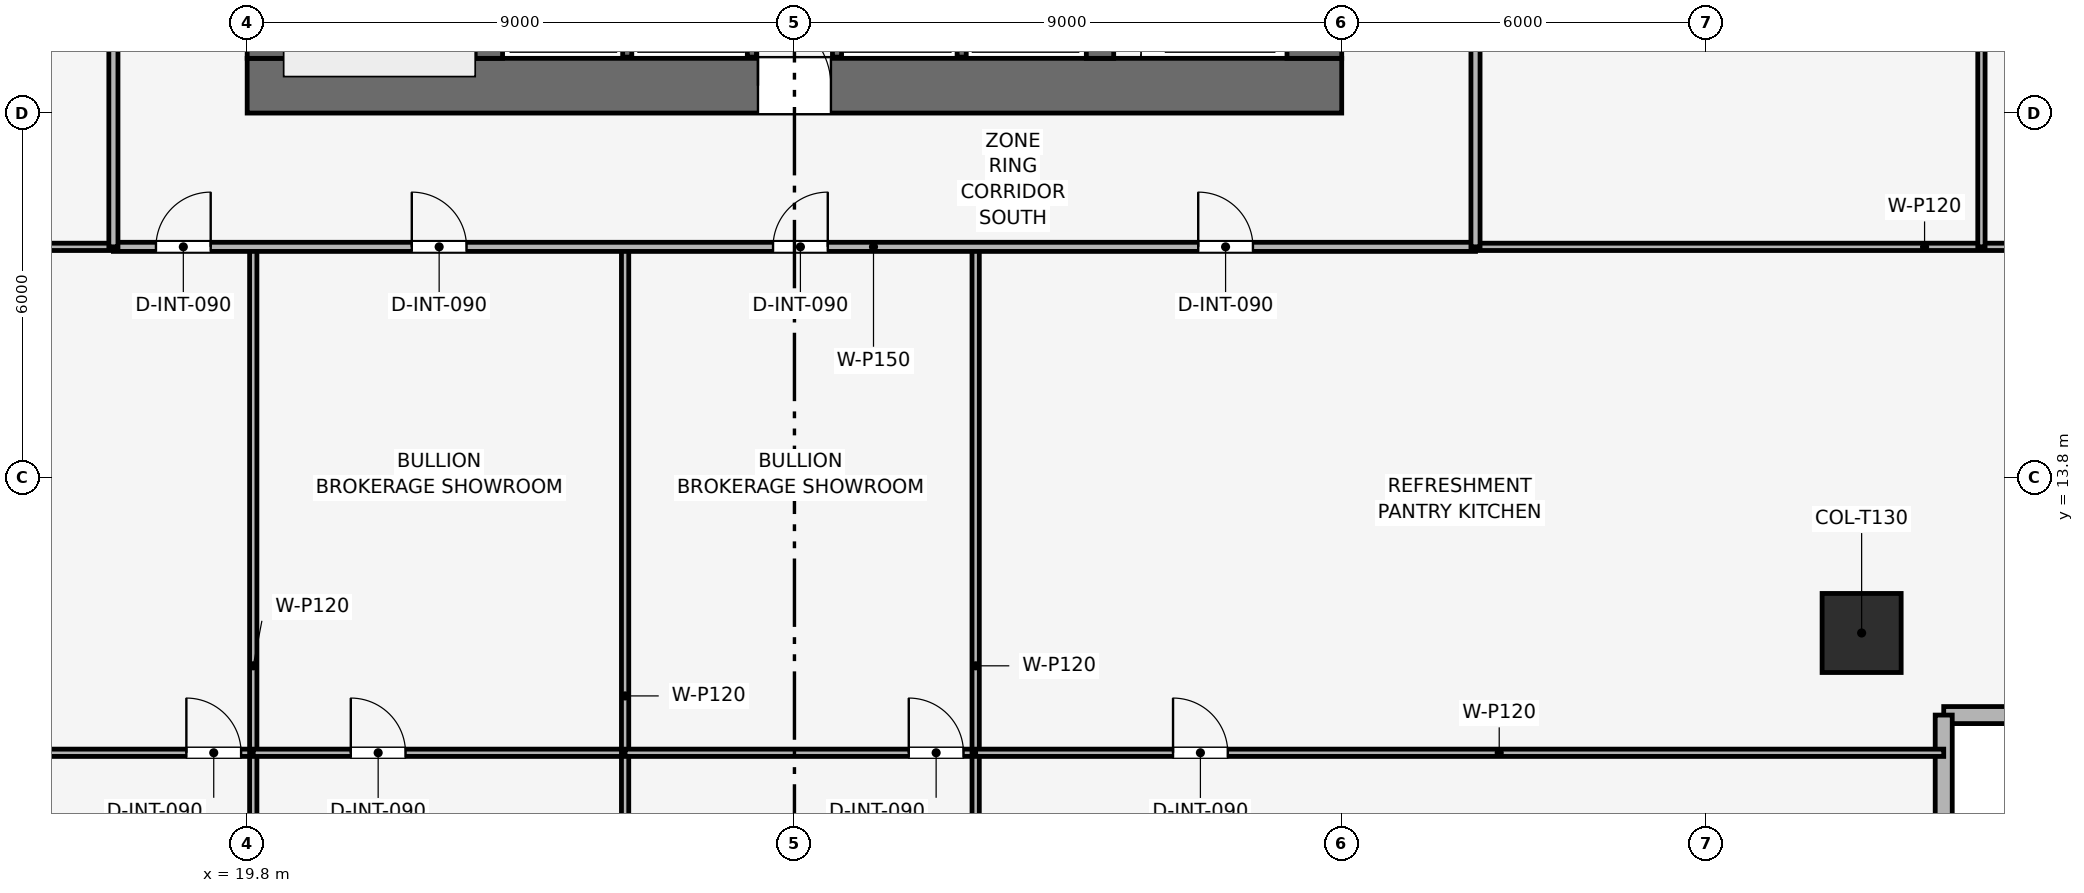
"""IFC4 building model, lengths in metres.
Left out: names, types, materials, properties, quantities, classifications, styles, units other than length and angle.
Written with IfcOpenShell. Run it as: python <this file> out.ifc"""

import sys

from ifc_helpers import new_model, si_unit, direction, frame, frame_2d, origin, origin_2d, place, context, subcontext, project, spatial, rectangle, extrude, element, fill, save


model = new_model("IFC4")
c1 = context("Model", 3, precision=1e-05, world=origin(), true_north=direction((0.0, 1.0)))
c2 = subcontext(c1, "Body", "Model", "MODEL_VIEW")
j1 = project(units=[si_unit("LENGTHUNIT", "METRE"), si_unit("PLANEANGLEUNIT", "RADIAN")], contexts=[c1])
p1 = place(None, origin())
s1 = spatial("IfcSite", under=j1, at=p1, CompositionType="ELEMENT")
p2 = place(p1, origin())
s2 = spatial("IfcBuilding", under=s1, at=p2, CompositionType="ELEMENT")
p3 = place(p2, frame((0.0, 0.0, 125.1)))
s3 = spatial("IfcBuildingStorey", under=s2, at=p3, CompositionType="ELEMENT", Elevation=125.1)
p4 = place(p3, frame((19.8, 20.25, 0.0), z_axis=(0.0, 0.0, 1.0), x_axis=(1.0, 0.0, 0.0)))
e1 = element("IfcWall", 1, at=p4, inside=s3, PredefinedType="SHEAR", context=c2, shape_type="SweptSolid", body=[
    extrude(rectangle(XDim=18.0, YDim=0.9, at=frame_2d((9.0, 0.0))), origin(), (0.0, 0.0, 1.0), 3.9),
])
p5 = place(p4, frame((8.4, 0.0, 0.0)))
e2 = element("IfcOpeningElement", 2, at=p5, cuts=e1, PredefinedType="OPENING", context=c2, shape_type="SweptSolid", body=[
    extrude(rectangle(XDim=1.2, YDim=2.2, at=frame_2d((0.6, 1.1))), frame((0.0, 0.46, 0.0), z_axis=(0.0, -1.0, 0.0), x_axis=(1.0, 0.0, 0.0)), (0.0, 0.0, 1.0), 0.92),
])
p6 = place(p3, frame((20.25, 20.7, 0.0), z_axis=(0.0, 0.0, 1.0), x_axis=(0.0, 1.0, 0.0)))
e3 = element("IfcWall", 3, at=p6, inside=s3, PredefinedType="SHEAR", context=c2, shape_type="SweptSolid", body=[
    extrude(rectangle(XDim=16.2, YDim=0.9, at=frame_2d((8.1, 0.0))), origin(), (0.0, 0.0, 1.0), 3.9),
])
p7 = place(p6, frame((10.1, 0.0, 0.0)))
e4 = element("IfcOpeningElement", 4, at=p7, cuts=e3, PredefinedType="OPENING", context=c2, shape_type="SweptSolid", body=[
    extrude(rectangle(XDim=1.1, YDim=2.15, at=frame_2d((0.55, 1.075))), frame((0.0, 0.46, 0.0), z_axis=(0.0, -1.0, 0.0), x_axis=(1.0, 0.0, 0.0)), (0.0, 0.0, 1.0), 0.92),
])
p8 = place(p3, frame((37.35, 20.7, 0.0), z_axis=(0.0, 0.0, 1.0), x_axis=(0.0, 1.0, 0.0)))
e5 = element("IfcWall", 5, at=p8, inside=s3, PredefinedType="SHEAR", context=c2, shape_type="SweptSolid", body=[
    extrude(rectangle(XDim=16.2, YDim=0.9, at=frame_2d((8.1, 0.0))), origin(), (0.0, 0.0, 1.0), 3.9),
])
p9 = place(p8, frame((4.6, 0.0, 0.0)))
e6 = element("IfcOpeningElement", 6, at=p9, cuts=e5, PredefinedType="OPENING", context=c2, shape_type="SweptSolid", body=[
    extrude(rectangle(XDim=1.1, YDim=2.15, at=frame_2d((0.55, 1.075))), frame((0.0, 0.46, 0.0), z_axis=(0.0, -1.0, 0.0), x_axis=(1.0, 0.0, 0.0)), (0.0, 0.0, 1.0), 0.92),
])
for number, where, z_axis, x_axis in (
    (7, (23.775, 20.7, 0.0), (0.0, 0.0, 1.0), (0.0, 1.0, 0.0)),
    (8, (33.825, 20.7, 0.0), (0.0, 0.0, 1.0), (0.0, 1.0, 0.0)),
):
    element("IfcWall", number, at=place(p3, frame(where, z_axis=z_axis, x_axis=x_axis)), inside=s3, PredefinedType="SHEAR", context=c2, shape_type="SweptSolid", body=[
        extrude(rectangle(XDim=16.2, YDim=0.45, at=frame_2d((8.1, 0.0))), origin(), (0.0, 0.0, 1.0), 3.9),
    ])
p10 = place(p3, frame((46.35, 11.25, 0.003), z_axis=(0.0, 0.0, 1.0), x_axis=(1.0, 0.0, 0.0)))
e9 = element("IfcColumn", 9, at=p10, inside=s3, PredefinedType="COLUMN", context=c2, shape_type="SweptSolid", body=[
    extrude(rectangle(XDim=1.3, YDim=1.3, at=origin_2d()), origin(), (0.0, 0.0, 1.0), 3.644),
])
p11 = place(p3, frame((54.77, 9.9, 0.0), z_axis=(0.0, 0.0, 1.0), x_axis=(-1.0, 0.0, 0.0)))
e10 = element("IfcWall", 10, at=p11, inside=s3, PredefinedType="SOLIDWALL", context=c2, shape_type="SweptSolid", body=[
    extrude(rectangle(XDim=7.07, YDim=0.28, at=frame_2d((3.535, 0.0))), origin(), (0.0, 0.0, 1.0), 3.65),
])
p12 = place(p11, frame((2.285, 0.0, 0.9)))
e11 = element("IfcOpeningElement", 11, at=p12, cuts=e10, PredefinedType="OPENING", context=c2, shape_type="SweptSolid", body=[
    extrude(rectangle(XDim=2.5, YDim=1.9, at=frame_2d((1.25, 0.95))), frame((0.0, 0.15, 0.0), z_axis=(0.0, -1.0, 0.0), x_axis=(1.0, 0.0, 0.0)), (0.0, 0.0, 1.0), 0.3),
])
p13 = place(p3, frame((47.7, 9.9, 0.0), z_axis=(0.0, 0.0, 1.0), x_axis=(0.0, -1.0, 0.0)))
e12 = element("IfcWall", 12, at=p13, inside=s3, PredefinedType="SOLIDWALL", context=c2, shape_type="SweptSolid", body=[
    extrude(rectangle(XDim=7.07, YDim=0.28, at=frame_2d((3.535, 0.0))), origin(), (0.0, 0.0, 1.0), 3.65),
])
p14 = place(p13, frame((2.285, 0.0, 0.9)))
e13 = element("IfcOpeningElement", 13, at=p14, cuts=e12, PredefinedType="OPENING", context=c2, shape_type="SweptSolid", body=[
    extrude(rectangle(XDim=2.5, YDim=1.9, at=frame_2d((1.25, 0.95))), frame((0.0, 0.15, 0.0), z_axis=(0.0, -1.0, 0.0), x_axis=(1.0, 0.0, 0.0)), (0.0, 0.0, 1.0), 0.3),
])
for number, where, z_axis, x_axis in (
    (14, (26.05, 20.72, 0.0), (0.0, 0.0, 1.0), (0.0, 1.0, 0.0)),
    (15, (28.1, 20.72, 0.0), (0.0, 0.0, 1.0), (0.0, 1.0, 0.0)),
    (16, (29.5, 20.72, 0.0), (0.0, 0.0, 1.0), (0.0, 1.0, 0.0)),
    (17, (31.55, 20.72, 0.0), (0.0, 0.0, 1.0), (0.0, 1.0, 0.0)),
):
    element("IfcWall", number, at=place(p3, frame(where, z_axis=z_axis, x_axis=x_axis)), inside=s3, PredefinedType="SHEAR", context=c2, shape_type="SweptSolid", body=[
        extrude(rectangle(XDim=2.26, YDim=0.15, at=frame_2d((1.13, 0.0))), origin(), (0.0, 0.0, 1.0), 3.65),
    ])
p15 = place(p3, frame((9.9, 9.28, 0.0), z_axis=(0.0, 0.0, 1.0), x_axis=(1.0, 0.0, 0.0)))
e18 = element("IfcWall", 18, at=p15, inside=s3, PredefinedType="PARTITIONING", context=c2, shape_type="SweptSolid", body=[
    extrude(rectangle(XDim=10.0, YDim=0.12, at=frame_2d((5.0, 0.0))), origin(), (0.0, 0.0, 1.0), 3.035),
])
p16 = place(p15, frame((8.9, 0.0, 0.0)))
e19 = element("IfcOpeningElement", 19, at=p16, cuts=e18, PredefinedType="OPENING", context=c2, shape_type="SweptSolid", body=[
    extrude(rectangle(XDim=0.9, YDim=2.1, at=frame_2d((0.45, 1.05))), frame((0.0, 0.07, 0.0), z_axis=(0.0, -1.0, 0.0), x_axis=(1.0, 0.0, 0.0)), (0.0, 0.0, 1.0), 0.14),
])
p17 = place(p3, frame((19.9, 2.83, 0.0), z_axis=(0.0, 0.0, 1.0), x_axis=(0.0, 1.0, 0.0)))
e20 = element("IfcWall", 20, at=p17, inside=s3, PredefinedType="PARTITIONING", context=c2, shape_type="SweptSolid", body=[
    extrude(rectangle(XDim=14.77, YDim=0.12, at=frame_2d((7.385, 0.0))), origin(), (0.0, 0.0, 1.0), 3.035),
])
p18 = place(p3, frame((19.9, 9.28, 0.0), z_axis=(0.0, 0.0, 1.0), x_axis=(1.0, 0.0, 0.0)))
e21 = element("IfcWall", 21, at=p18, inside=s3, PredefinedType="PARTITIONING", context=c2, shape_type="SweptSolid", body=[
    extrude(rectangle(XDim=6.115, YDim=0.12, at=frame_2d((3.058, 0.0))), origin(), (0.0, 0.0, 1.0), 3.185),
])
p19 = place(p18, frame((1.604, 0.0, 0.0)))
e22 = element("IfcOpeningElement", 22, at=p19, cuts=e21, PredefinedType="OPENING", context=c2, shape_type="SweptSolid", body=[
    extrude(rectangle(XDim=0.9, YDim=2.1, at=frame_2d((0.45, 1.05))), frame((0.0, 0.07, 0.0), z_axis=(0.0, -1.0, 0.0), x_axis=(1.0, 0.0, 0.0)), (0.0, 0.0, 1.0), 0.14),
])
p20 = place(p3, frame((26.015, 2.83, 0.0), z_axis=(0.0, 0.0, 1.0), x_axis=(0.0, 1.0, 0.0)))
e23 = element("IfcWall", 23, at=p20, inside=s3, PredefinedType="PARTITIONING", context=c2, shape_type="SweptSolid", body=[
    extrude(rectangle(XDim=14.77, YDim=0.12, at=frame_2d((7.385, 0.0))), origin(), (0.0, 0.0, 1.0), 3.035),
])
p21 = place(p3, frame((26.015, 9.28, 0.0), z_axis=(0.0, 0.0, 1.0), x_axis=(1.0, 0.0, 0.0)))
e24 = element("IfcWall", 24, at=p21, inside=s3, PredefinedType="PARTITIONING", context=c2, shape_type="SweptSolid", body=[
    extrude(rectangle(XDim=5.765, YDim=0.12, at=frame_2d((2.883, 0.0))), origin(), (0.0, 0.0, 1.0), 3.185),
])
p22 = place(p21, frame((4.665, 0.0, 0.0)))
e25 = element("IfcOpeningElement", 25, at=p22, cuts=e24, PredefinedType="OPENING", context=c2, shape_type="SweptSolid", body=[
    extrude(rectangle(XDim=0.9, YDim=2.1, at=frame_2d((0.45, 1.05))), frame((0.0, 0.07, 0.0), z_axis=(0.0, -1.0, 0.0), x_axis=(1.0, 0.0, 0.0)), (0.0, 0.0, 1.0), 0.14),
])
p23 = place(p3, frame((31.78, 2.83, 0.0), z_axis=(0.0, 0.0, 1.0), x_axis=(0.0, 1.0, 0.0)))
e26 = element("IfcWall", 26, at=p23, inside=s3, PredefinedType="PARTITIONING", context=c2, shape_type="SweptSolid", body=[
    extrude(rectangle(XDim=14.77, YDim=0.12, at=frame_2d((7.385, 0.0))), origin(), (0.0, 0.0, 1.0), 3.035),
])
p24 = place(p3, frame((31.78, 9.28, 0.0), z_axis=(0.0, 0.0, 1.0), x_axis=(1.0, 0.0, 0.0)))
e27 = element("IfcWall", 27, at=p24, inside=s3, PredefinedType="PARTITIONING", context=c2, shape_type="SweptSolid", body=[
    extrude(rectangle(XDim=15.92, YDim=0.12, at=frame_2d((7.96, 0.0))), origin(), (0.0, 0.0, 1.0), 3.035),
])
p25 = place(p24, frame((3.246, 0.0, 0.0)))
e28 = element("IfcOpeningElement", 28, at=p25, cuts=e27, PredefinedType="OPENING", context=c2, shape_type="SweptSolid", body=[
    extrude(rectangle(XDim=0.9, YDim=2.1, at=frame_2d((0.45, 1.05))), frame((0.0, 0.07, 0.0), z_axis=(0.0, -1.0, 0.0), x_axis=(1.0, 0.0, 0.0)), (0.0, 0.0, 1.0), 0.14),
])
for number, where, z_axis, x_axis in (
    (29, (2.83, 17.6, 0.0), (0.0, 0.0, 1.0), (1.0, 0.0, 0.0)),
    (30, (40.0, 17.6, 0.0), (0.0, 0.0, 1.0), (1.0, 0.0, 0.0)),
):
    element("IfcWall", number, at=place(p3, frame(where, z_axis=z_axis, x_axis=x_axis)), inside=s3, PredefinedType="PARTITIONING", context=c2, shape_type="SweptSolid", body=[
        extrude(rectangle(XDim=14.77, YDim=0.12, at=frame_2d((7.385, 0.0))), origin(), (0.0, 0.0, 1.0), 3.035),
    ])
p26 = place(p3, frame((48.32, 17.6, 0.0), z_axis=(0.0, 0.0, 1.0), x_axis=(0.0, 1.0, 0.0)))
e31 = element("IfcWall", 31, at=p26, inside=s3, PredefinedType="PARTITIONING", context=c2, shape_type="SweptSolid", body=[
    extrude(rectangle(XDim=22.4, YDim=0.12, at=frame_2d((11.2, 0.0))), origin(), (0.0, 0.0, 1.0), 3.185),
])
p27 = place(p26, frame((17.783, 0.0, 0.0)))
e32 = element("IfcOpeningElement", 32, at=p27, cuts=e31, PredefinedType="OPENING", context=c2, shape_type="SweptSolid", body=[
    extrude(rectangle(XDim=0.9, YDim=2.1, at=frame_2d((0.45, 1.05))), frame((0.0, 0.07, 0.0), z_axis=(0.0, -1.0, 0.0), x_axis=(1.0, 0.0, 0.0)), (0.0, 0.0, 1.0), 0.14),
])
p28 = place(p3, frame((17.6, 17.6, 0.0), z_axis=(0.0, 0.0, 1.0), x_axis=(1.0, 0.0, 0.0)))
e33 = element("IfcWall", 33, at=p28, inside=s3, PredefinedType="PARTITIONING", context=c2, shape_type="SweptSolid", body=[
    extrude(rectangle(XDim=22.4, YDim=0.15, at=frame_2d((11.2, 0.0))), origin(), (0.0, 0.0, 1.0), 3.185),
])
p29 = place(p28, frame((0.7, 0.0, 0.0)))
e34 = element("IfcOpeningElement", 34, at=p29, cuts=e33, PredefinedType="OPENING", context=c2, shape_type="SweptSolid", body=[
    extrude(rectangle(XDim=0.9, YDim=2.1, at=frame_2d((0.45, 1.05))), frame((0.0, 0.085, 0.0), z_axis=(0.0, -1.0, 0.0), x_axis=(1.0, 0.0, 0.0)), (0.0, 0.0, 1.0), 0.17),
])
p30 = place(p28, frame((4.907, 0.0, 0.0)))
e35 = element("IfcOpeningElement", 35, at=p30, cuts=e33, PredefinedType="OPENING", context=c2, shape_type="SweptSolid", body=[
    extrude(rectangle(XDim=0.9, YDim=2.1, at=frame_2d((0.45, 1.05))), frame((0.0, 0.085, 0.0), z_axis=(0.0, -1.0, 0.0), x_axis=(1.0, 0.0, 0.0)), (0.0, 0.0, 1.0), 0.17),
])
p31 = place(p28, frame((10.848, 0.0, 0.0)))
e36 = element("IfcOpeningElement", 36, at=p31, cuts=e33, PredefinedType="OPENING", context=c2, shape_type="SweptSolid", body=[
    extrude(rectangle(XDim=0.9, YDim=2.1, at=frame_2d((0.45, 1.05))), frame((0.0, 0.085, 0.0), z_axis=(0.0, -1.0, 0.0), x_axis=(1.0, 0.0, 0.0)), (0.0, 0.0, 1.0), 0.17),
])
p32 = place(p28, frame((17.84, 0.0, 0.0)))
e37 = element("IfcOpeningElement", 37, at=p32, cuts=e33, PredefinedType="OPENING", context=c2, shape_type="SweptSolid", body=[
    extrude(rectangle(XDim=0.9, YDim=2.1, at=frame_2d((0.45, 1.05))), frame((0.0, 0.085, 0.0), z_axis=(0.0, -1.0, 0.0), x_axis=(1.0, 0.0, 0.0)), (0.0, 0.0, 1.0), 0.17),
])
p33 = place(p3, frame((17.6, 17.6, 0.0), z_axis=(0.0, 0.0, 1.0), x_axis=(0.0, 1.0, 0.0)))
e38 = element("IfcWall", 38, at=p33, inside=s3, PredefinedType="PARTITIONING", context=c2, shape_type="SweptSolid", body=[
    extrude(rectangle(XDim=22.4, YDim=0.15, at=frame_2d((11.2, 0.0))), origin(), (0.0, 0.0, 1.0), 3.185),
])
p34 = place(p33, frame((4.616, 0.0, 0.0)))
e39 = element("IfcOpeningElement", 39, at=p34, cuts=e38, PredefinedType="OPENING", context=c2, shape_type="SweptSolid", body=[
    extrude(rectangle(XDim=0.9, YDim=2.1, at=frame_2d((0.45, 1.05))), frame((0.0, 0.085, 0.0), z_axis=(0.0, -1.0, 0.0), x_axis=(1.0, 0.0, 0.0)), (0.0, 0.0, 1.0), 0.17),
])
p35 = place(p33, frame((15.816, 0.0, 0.0)))
e40 = element("IfcOpeningElement", 40, at=p35, cuts=e38, PredefinedType="OPENING", context=c2, shape_type="SweptSolid", body=[
    extrude(rectangle(XDim=0.9, YDim=2.1, at=frame_2d((0.45, 1.05))), frame((0.0, 0.085, 0.0), z_axis=(0.0, -1.0, 0.0), x_axis=(1.0, 0.0, 0.0)), (0.0, 0.0, 1.0), 0.17),
])
p36 = place(p3, frame((40.0, 17.6, 0.0), z_axis=(0.0, 0.0, 1.0), x_axis=(0.0, 1.0, 0.0)))
e41 = element("IfcWall", 41, at=p36, inside=s3, PredefinedType="PARTITIONING", context=c2, shape_type="SweptSolid", body=[
    extrude(rectangle(XDim=22.4, YDim=0.15, at=frame_2d((11.2, 0.0))), origin(), (0.0, 0.0, 1.0), 3.185),
])
p37 = place(p36, frame((10.75, 0.0, 0.0)))
e42 = element("IfcOpeningElement", 42, at=p37, cuts=e41, PredefinedType="OPENING", context=c2, shape_type="SweptSolid", body=[
    extrude(rectangle(XDim=0.9, YDim=2.1, at=frame_2d((0.45, 1.05))), frame((0.0, 0.085, 0.0), z_axis=(0.0, -1.0, 0.0), x_axis=(1.0, 0.0, 0.0)), (0.0, 0.0, 1.0), 0.17),
])
p38 = place(p16, origin())
e43 = element("IfcDoor", 43, at=p38, inside=s3, OperationType="SINGLE_SWING_LEFT", PredefinedType="DOOR", context=c2, shape_type="SweptSolid", body=[
    extrude(rectangle(XDim=0.9, YDim=2.1, at=frame_2d((0.45, 1.05))), frame((0.0, 0.025, 0.0), z_axis=(0.0, -1.0, 0.0), x_axis=(1.0, 0.0, 0.0)), (0.0, 0.0, 1.0), 0.05),
])
fill(e19, e43)
p39 = place(p19, origin())
e44 = element("IfcDoor", 44, at=p39, inside=s3, OperationType="SINGLE_SWING_LEFT", PredefinedType="DOOR", context=c2, shape_type="SweptSolid", body=[
    extrude(rectangle(XDim=0.9, YDim=2.1, at=frame_2d((0.45, 1.05))), frame((0.0, 0.025, 0.0), z_axis=(0.0, -1.0, 0.0), x_axis=(1.0, 0.0, 0.0)), (0.0, 0.0, 1.0), 0.05),
])
fill(e22, e44)
p40 = place(p22, origin())
e45 = element("IfcDoor", 45, at=p40, inside=s3, OperationType="SINGLE_SWING_LEFT", PredefinedType="DOOR", context=c2, shape_type="SweptSolid", body=[
    extrude(rectangle(XDim=0.9, YDim=2.1, at=frame_2d((0.45, 1.05))), frame((0.0, 0.025, 0.0), z_axis=(0.0, -1.0, 0.0), x_axis=(1.0, 0.0, 0.0)), (0.0, 0.0, 1.0), 0.05),
])
fill(e25, e45)
p41 = place(p25, origin())
e46 = element("IfcDoor", 46, at=p41, inside=s3, OperationType="SINGLE_SWING_LEFT", PredefinedType="DOOR", context=c2, shape_type="SweptSolid", body=[
    extrude(rectangle(XDim=0.9, YDim=2.1, at=frame_2d((0.45, 1.05))), frame((0.0, 0.025, 0.0), z_axis=(0.0, -1.0, 0.0), x_axis=(1.0, 0.0, 0.0)), (0.0, 0.0, 1.0), 0.05),
])
fill(e28, e46)
p42 = place(p29, origin())
e47 = element("IfcDoor", 47, at=p42, inside=s3, OperationType="SINGLE_SWING_RIGHT", PredefinedType="DOOR", context=c2, shape_type="SweptSolid", body=[
    extrude(rectangle(XDim=0.9, YDim=2.1, at=frame_2d((0.45, 1.05))), frame((0.0, 0.025, 0.0), z_axis=(0.0, -1.0, 0.0), x_axis=(1.0, 0.0, 0.0)), (0.0, 0.0, 1.0), 0.05),
])
fill(e34, e47)
p43 = place(p30, origin())
e48 = element("IfcDoor", 48, at=p43, inside=s3, OperationType="SINGLE_SWING_LEFT", PredefinedType="DOOR", context=c2, shape_type="SweptSolid", body=[
    extrude(rectangle(XDim=0.9, YDim=2.1, at=frame_2d((0.45, 1.05))), frame((0.0, 0.025, 0.0), z_axis=(0.0, -1.0, 0.0), x_axis=(1.0, 0.0, 0.0)), (0.0, 0.0, 1.0), 0.05),
])
fill(e35, e48)
p44 = place(p31, origin())
e49 = element("IfcDoor", 49, at=p44, inside=s3, OperationType="SINGLE_SWING_RIGHT", PredefinedType="DOOR", context=c2, shape_type="SweptSolid", body=[
    extrude(rectangle(XDim=0.9, YDim=2.1, at=frame_2d((0.45, 1.05))), frame((0.0, 0.025, 0.0), z_axis=(0.0, -1.0, 0.0), x_axis=(1.0, 0.0, 0.0)), (0.0, 0.0, 1.0), 0.05),
])
fill(e36, e49)
p45 = place(p32, origin())
e50 = element("IfcDoor", 50, at=p45, inside=s3, OperationType="SINGLE_SWING_LEFT", PredefinedType="DOOR", context=c2, shape_type="SweptSolid", body=[
    extrude(rectangle(XDim=0.9, YDim=2.1, at=frame_2d((0.45, 1.05))), frame((0.0, 0.025, 0.0), z_axis=(0.0, -1.0, 0.0), x_axis=(1.0, 0.0, 0.0)), (0.0, 0.0, 1.0), 0.05),
])
fill(e37, e50)
p46 = place(p5, origin())
e51 = element("IfcDoor", 51, at=p46, inside=s3, OperationType="SINGLE_SWING_LEFT", PredefinedType="DOOR", context=c2, shape_type="SweptSolid", body=[
    extrude(rectangle(XDim=1.2, YDim=2.2, at=frame_2d((0.6, 1.1))), frame((0.0, 0.025, 0.0), z_axis=(0.0, -1.0, 0.0), x_axis=(1.0, 0.0, 0.0)), (0.0, 0.0, 1.0), 0.05),
])
fill(e2, e51)
save(model, sys.argv[1])
